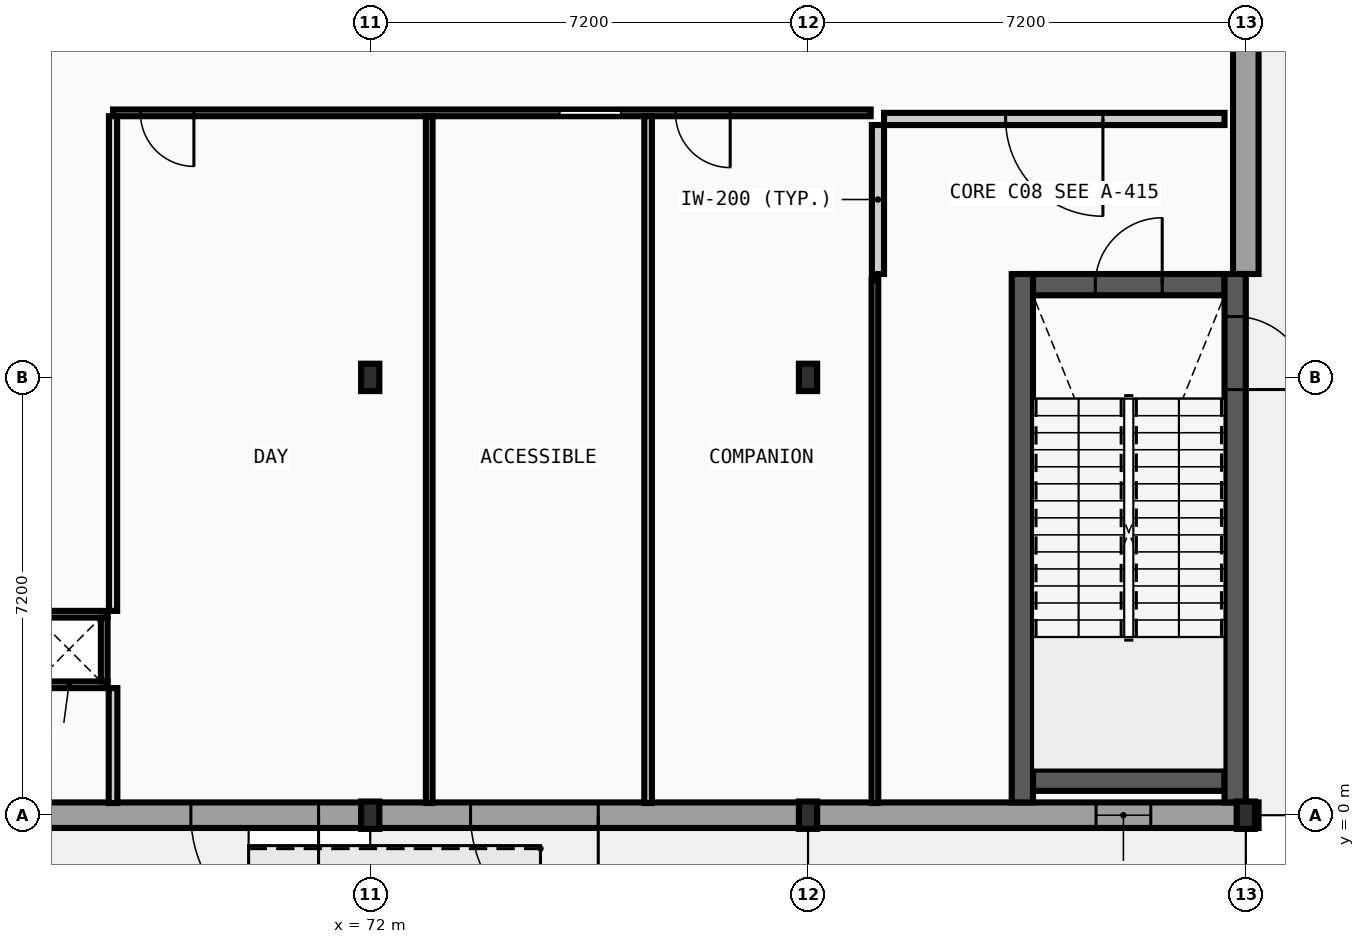
"""IFC4 building model, lengths in metres.
Left out: names, types, materials, properties, quantities, classifications, styles, units other than length and angle.
Written with IfcOpenShell. Run it as: python <this file> out.ifc"""

import sys

from ifc_helpers import new_model, si_unit, direction, frame, frame_2d, origin, origin_2d, place, context, subcontext, project, spatial, rectangle, i_section, extrude, element, fill, save


model = new_model("IFC4")
c1 = context("Model", 3, precision=1e-05, world=origin(), true_north=direction((0.0, 1.0)))
c2 = subcontext(c1, "Body", "Model", "MODEL_VIEW")
j1 = project(units=[si_unit("LENGTHUNIT", "METRE"), si_unit("PLANEANGLEUNIT", "RADIAN")], contexts=[c1])
p1 = place(None, origin())
s1 = spatial("IfcSite", under=j1, at=p1, CompositionType="ELEMENT")
p2 = place(p1, origin())
s2 = spatial("IfcBuilding", under=s1, at=p2, CompositionType="ELEMENT")
p3 = place(p2, origin())
s3 = spatial("IfcBuildingStorey", under=s2, at=p3, CompositionType="ELEMENT", Elevation=0.0)
for number, where, z_axis, x_axis in (
    (1, (72.0, 0.0, 0.0), (0.0, 0.0, 1.0), (1.0, 0.0, 0.0)),
    (2, (72.0, 7.2, 0.0), (0.0, 0.0, 1.0), (1.0, 0.0, 0.0)),
    (3, (79.2, 0.0, 0.0), (0.0, 0.0, 1.0), (1.0, 0.0, 0.0)),
    (4, (79.2, 7.2, 0.0), (0.0, 0.0, 1.0), (1.0, 0.0, 0.0)),
    (5, (86.4, 0.0, 0.0), (0.0, 0.0, 1.0), (1.0, 0.0, 0.0)),
):
    element("IfcColumn", number, at=place(p3, frame(where, z_axis=z_axis, x_axis=x_axis)), inside=s3, PredefinedType="COLUMN", context=c2, shape_type="SweptSolid", body=[
        extrude(i_section(OverallWidth=0.3, OverallDepth=0.45, WebThickness=0.014, FlangeThickness=0.026, FilletRadius=0.027, at=origin_2d()), origin(), (0.0, 0.0, 1.0), 5.2),
    ])
p4 = place(p3, frame((64.8, 0.0, 0.0), z_axis=(0.0, 0.0, 1.0), x_axis=(1.0, 0.0, 0.0)))
e6 = element("IfcWall", 6, at=p4, inside=s3, PredefinedType="STANDARD", context=c2, shape_type="SweptSolid", body=[
    extrude(rectangle(XDim=7.2, YDim=0.42, at=frame_2d((3.6, 0.0))), origin(), (0.0, 0.0, 1.0), 4.665),
])
p5 = place(p4, frame((4.25, 0.0, 0.0)))
e7 = element("IfcOpeningElement", 7, at=p5, cuts=e6, PredefinedType="OPENING", context=c2, shape_type="SweptSolid", body=[
    extrude(rectangle(XDim=2.1, YDim=2.4, at=frame_2d((1.05, 1.2))), frame((0.0, 0.22, 0.0), z_axis=(0.0, -1.0, 0.0), x_axis=(1.0, 0.0, 0.0)), (0.0, 0.0, 1.0), 0.44),
])
p6 = place(p3, frame((72.0, 0.0, 0.0), z_axis=(0.0, 0.0, 1.0), x_axis=(1.0, 0.0, 0.0)))
e8 = element("IfcWall", 8, at=p6, inside=s3, PredefinedType="STANDARD", context=c2, shape_type="SweptSolid", body=[
    extrude(rectangle(XDim=7.2, YDim=0.42, at=frame_2d((3.6, 0.0))), origin(), (0.0, 0.0, 1.0), 4.665),
])
p7 = place(p6, frame((1.65, 0.0, 0.0)))
e9 = element("IfcOpeningElement", 9, at=p7, cuts=e8, PredefinedType="OPENING", context=c2, shape_type="SweptSolid", body=[
    extrude(rectangle(XDim=2.1, YDim=2.4, at=frame_2d((1.05, 1.2))), frame((0.0, 0.22, 0.0), z_axis=(0.0, -1.0, 0.0), x_axis=(1.0, 0.0, 0.0)), (0.0, 0.0, 1.0), 0.44),
])
p8 = place(p3, frame((79.2, 0.0, 0.0), z_axis=(0.0, 0.0, 1.0), x_axis=(1.0, 0.0, 0.0)))
e10 = element("IfcWall", 10, at=p8, inside=s3, PredefinedType="STANDARD", context=c2, shape_type="SweptSolid", body=[
    extrude(rectangle(XDim=7.41, YDim=0.42, at=frame_2d((3.705, 0.0))), origin(), (0.0, 0.0, 1.0), 4.665),
])
p9 = place(p8, frame((4.737, 0.0, 1.1)))
e11 = element("IfcOpeningElement", 11, at=p9, cuts=e10, PredefinedType="OPENING", context=c2, shape_type="SweptSolid", body=[
    extrude(rectangle(XDim=0.9, YDim=1.6, at=frame_2d((0.45, 0.8))), frame((0.0, 0.22, 0.0), z_axis=(0.0, -1.0, 0.0), x_axis=(1.0, 0.0, 0.0)), (0.0, 0.0, 1.0), 0.44),
])
p10 = place(p3, frame((86.4, 8.9, 0.0), z_axis=(0.0, 0.0, 1.0), x_axis=(0.0, 1.0, 0.0)))
e12 = element("IfcWall", 12, at=p10, inside=s3, PredefinedType="STANDARD", context=c2, shape_type="SweptSolid", body=[
    extrude(rectangle(XDim=5.5, YDim=0.42, at=frame_2d((2.75, 0.0))), origin(), (0.0, 0.0, 1.0), 4.97),
])
p11 = place(p3, frame((82.9, 0.575, 0.0), z_axis=(0.0, 0.0, 1.0), x_axis=(1.0, 0.0, 0.0)))
e13 = element("IfcWall", 13, at=p11, inside=s3, PredefinedType="SHEAR", context=c2, shape_type="SweptSolid", body=[
    extrude(rectangle(XDim=3.15, YDim=0.35, at=frame_2d((1.575, 0.0))), origin(), (0.0, 0.0, 1.0), 4.97),
])
p12 = place(p3, frame((82.9, 8.725, 0.0), z_axis=(0.0, 0.0, 1.0), x_axis=(1.0, 0.0, 0.0)))
e14 = element("IfcWall", 14, at=p12, inside=s3, PredefinedType="SHEAR", context=c2, shape_type="SweptSolid", body=[
    extrude(rectangle(XDim=3.15, YDim=0.35, at=frame_2d((1.575, 0.0))), origin(), (0.0, 0.0, 1.0), 4.97),
])
p13 = place(p12, frame((1.025, 0.0, 0.0)))
e15 = element("IfcOpeningElement", 15, at=p13, cuts=e14, PredefinedType="OPENING", context=c2, shape_type="SweptSolid", body=[
    extrude(rectangle(XDim=1.1, YDim=2.15, at=frame_2d((0.55, 1.075))), frame((0.0, 0.185, 0.0), z_axis=(0.0, -1.0, 0.0), x_axis=(1.0, 0.0, 0.0)), (0.0, 0.0, 1.0), 0.37),
])
p14 = place(p3, frame((82.725, 0.21, 0.0), z_axis=(0.0, 0.0, 1.0), x_axis=(0.0, 1.0, 0.0)))
e16 = element("IfcWall", 16, at=p14, inside=s3, PredefinedType="SHEAR", context=c2, shape_type="SweptSolid", body=[
    extrude(rectangle(XDim=8.69, YDim=0.35, at=frame_2d((4.345, 0.0))), origin(), (0.0, 0.0, 1.0), 4.97),
])
p15 = place(p3, frame((86.225, 0.21, 0.0), z_axis=(0.0, 0.0, 1.0), x_axis=(0.0, 1.0, 0.0)))
e17 = element("IfcWall", 17, at=p15, inside=s3, PredefinedType="SHEAR", context=c2, shape_type="SweptSolid", body=[
    extrude(rectangle(XDim=8.69, YDim=0.35, at=frame_2d((4.345, 0.0))), origin(), (0.0, 0.0, 1.0), 4.97),
])
p16 = place(p15, frame((6.79, 0.0, 0.0)))
e18 = element("IfcOpeningElement", 18, at=p16, cuts=e17, PredefinedType="OPENING", context=c2, shape_type="SweptSolid", body=[
    extrude(rectangle(XDim=1.2, YDim=2.15, at=frame_2d((0.6, 1.075))), frame((0.0, 0.185, 0.0), z_axis=(0.0, -1.0, 0.0), x_axis=(1.0, 0.0, 0.0)), (0.0, 0.0, 1.0), 0.37),
])
p17 = place(p3, frame((80.45, 11.45, 0.0), z_axis=(0.0, 0.0, 1.0), x_axis=(1.0, 0.0, 0.0)))
e19 = element("IfcWall", 19, at=p17, inside=s3, PredefinedType="PARTITIONING", context=c2, shape_type="SweptSolid", body=[
    extrude(rectangle(XDim=5.6, YDim=0.2, at=frame_2d((2.8, 0.0))), origin(), (0.0, 0.0, 1.0), 4.97),
])
p18 = place(p17, frame((2.0, 0.0, 0.0)))
e20 = element("IfcOpeningElement", 20, at=p18, cuts=e19, PredefinedType="OPENING", context=c2, shape_type="SweptSolid", body=[
    extrude(rectangle(XDim=1.6, YDim=2.2, at=frame_2d((0.8, 1.1))), frame((0.0, 0.11, 0.0), z_axis=(0.0, -1.0, 0.0), x_axis=(1.0, 0.0, 0.0)), (0.0, 0.0, 1.0), 0.22),
])
p19 = place(p3, frame((80.35, 8.9, 0.0), z_axis=(0.0, 0.0, 1.0), x_axis=(0.0, 1.0, 0.0)))
e21 = element("IfcWall", 21, at=p19, inside=s3, PredefinedType="PARTITIONING", context=c2, shape_type="SweptSolid", body=[
    extrude(rectangle(XDim=2.45, YDim=0.2, at=frame_2d((1.225, 0.0))), origin(), (0.0, 0.0, 1.0), 4.97),
])
for number, where, z_axis, x_axis in (
    (22, (66.41, 2.145, 0.0), (0.0, 0.0, 1.0), (1.0, 0.0, 0.0)),
    (23, (66.41, 3.305, 0.0), (0.0, 0.0, 1.0), (1.0, 0.0, 0.0)),
):
    element("IfcWall", number, at=place(p3, frame(where, z_axis=z_axis, x_axis=x_axis)), inside=s3, PredefinedType="PARTITIONING", context=c2, shape_type="SweptSolid", body=[
        extrude(rectangle(XDim=1.27, YDim=0.11, at=frame_2d((0.635, 0.0))), origin(), (0.0, 0.0, 1.0), 4.97),
    ])
p20 = place(p3, frame((67.625, 2.2, 0.0), z_axis=(0.0, 0.0, 1.0), x_axis=(0.0, 1.0, 0.0)))
e24 = element("IfcWall", 24, at=p20, inside=s3, PredefinedType="PARTITIONING", context=c2, shape_type="SweptSolid", body=[
    extrude(rectangle(XDim=1.05, YDim=0.11, at=frame_2d((0.525, 0.0))), origin(), (0.0, 0.0, 1.0), 4.97),
])
p21 = place(p3, frame((67.77, 11.55, 0.0), z_axis=(0.0, 0.0, 1.0), x_axis=(1.0, 0.0, 0.0)))
e25 = element("IfcWall", 25, at=p21, inside=s3, PredefinedType="PARTITIONING", context=c2, shape_type="SweptSolid", body=[
    extrude(rectangle(XDim=12.46, YDim=0.11, at=frame_2d((6.23, 0.0))), origin(), (0.0, 0.0, 1.0), 4.97),
])
p22 = place(p21, frame((7.35, 0.0, 0.0)))
e26 = element("IfcOpeningElement", 26, at=p22, cuts=e25, PredefinedType="OPENING", context=c2, shape_type="SweptSolid", body=[
    extrude(rectangle(XDim=1.0, YDim=2.1, at=frame_2d((0.5, 1.05))), frame((0.0, 0.065, 0.0), z_axis=(0.0, -1.0, 0.0), x_axis=(1.0, 0.0, 0.0)), (0.0, 0.0, 1.0), 0.13),
])
p23 = place(p21, frame((9.25, 0.0, 0.0)))
e27 = element("IfcOpeningElement", 27, at=p23, cuts=e25, PredefinedType="OPENING", context=c2, shape_type="SweptSolid", body=[
    extrude(rectangle(XDim=0.9, YDim=2.1, at=frame_2d((0.45, 1.05))), frame((0.0, 0.065, 0.0), z_axis=(0.0, -1.0, 0.0), x_axis=(1.0, 0.0, 0.0)), (0.0, 0.0, 1.0), 0.13),
])
p24 = place(p21, frame((0.45, 0.0, 0.0)))
e28 = element("IfcOpeningElement", 28, at=p24, cuts=e25, PredefinedType="OPENING", context=c2, shape_type="SweptSolid", body=[
    extrude(rectangle(XDim=0.88, YDim=2.096, at=frame_2d((0.44, 1.048))), frame((0.0, 0.065, 0.0), z_axis=(0.0, -1.0, 0.0), x_axis=(1.0, 0.0, 0.0)), (0.0, 0.0, 1.0), 0.13),
])
p25 = place(p3, frame((67.77, 0.2, 0.0), z_axis=(0.0, 0.0, 1.0), x_axis=(0.0, 1.0, 0.0)))
e29 = element("IfcWall", 29, at=p25, inside=s3, PredefinedType="PARTITIONING", context=c2, shape_type="SweptSolid", body=[
    extrude(rectangle(XDim=1.89, YDim=0.142, at=frame_2d((0.945, 0.0))), origin(), (0.0, 0.0, 1.0), 4.97),
])
p26 = place(p3, frame((67.77, 3.36, 0.0), z_axis=(0.0, 0.0, 1.0), x_axis=(0.0, 1.0, 0.0)))
e30 = element("IfcWall", 30, at=p26, inside=s3, PredefinedType="PARTITIONING", context=c2, shape_type="SweptSolid", body=[
    extrude(rectangle(XDim=8.135, YDim=0.135, at=frame_2d((4.067, 0.0))), origin(), (0.0, 0.0, 1.0), 4.97),
])
p27 = place(p3, frame((72.97, 0.2, 0.0), z_axis=(0.0, 0.0, 1.0), x_axis=(0.0, 1.0, 0.0)))
e31 = element("IfcWall", 31, at=p27, inside=s3, PredefinedType="PARTITIONING", context=c2, shape_type="SweptSolid", body=[
    extrude(rectangle(XDim=11.295, YDim=0.11, at=frame_2d((5.647, 0.0))), origin(), (0.0, 0.0, 1.0), 4.97),
])
p28 = place(p3, frame((76.57, 0.2, 0.0), z_axis=(0.0, 0.0, 1.0), x_axis=(0.0, 1.0, 0.0)))
e32 = element("IfcWall", 32, at=p28, inside=s3, PredefinedType="PARTITIONING", context=c2, shape_type="SweptSolid", body=[
    extrude(rectangle(XDim=11.295, YDim=0.125, at=frame_2d((5.647, 0.0))), origin(), (0.0, 0.0, 1.0), 4.97),
])
p29 = place(p3, frame((80.3, 0.2, 0.0), z_axis=(0.0, 0.0, 1.0), x_axis=(0.0, 1.0, 0.0)))
e33 = element("IfcWall", 33, at=p29, inside=s3, PredefinedType="PARTITIONING", context=c2, shape_type="SweptSolid", body=[
    extrude(rectangle(XDim=8.6, YDim=0.11, at=frame_2d((4.3, 0.0))), origin(), (0.0, 0.0, 1.0), 4.97),
])
p30 = place(p9, origin())
e34 = element("IfcWindow", 34, at=p30, inside=s3, PartitioningType="SINGLE_PANEL", PredefinedType="WINDOW", context=c2, shape_type="SweptSolid", body=[
    extrude(rectangle(XDim=0.9, YDim=1.6, at=frame_2d((0.45, 0.8))), frame((0.0, 0.03, 0.0), z_axis=(0.0, -1.0, 0.0), x_axis=(1.0, 0.0, 0.0)), (0.0, 0.0, 1.0), 0.06),
])
fill(e11, e34)
p31 = place(p7, origin())
e35 = element("IfcDoor", 35, at=p31, inside=s3, OperationType="DOUBLE_DOOR_SINGLE_SWING", PredefinedType="DOOR", context=c2, shape_type="SweptSolid", body=[
    extrude(rectangle(XDim=2.1, YDim=2.4, at=frame_2d((1.05, 1.2))), frame((0.0, 0.025, 0.0), z_axis=(0.0, -1.0, 0.0), x_axis=(1.0, 0.0, 0.0)), (0.0, 0.0, 1.0), 0.05),
])
fill(e9, e35)
p32 = place(p5, origin())
e36 = element("IfcDoor", 36, at=p32, inside=s3, OperationType="DOUBLE_DOOR_SINGLE_SWING", PredefinedType="DOOR", context=c2, shape_type="SweptSolid", body=[
    extrude(rectangle(XDim=2.1, YDim=2.4, at=frame_2d((1.05, 1.2))), frame((0.0, 0.025, 0.0), z_axis=(0.0, -1.0, 0.0), x_axis=(1.0, 0.0, 0.0)), (0.0, 0.0, 1.0), 0.05),
])
fill(e7, e36)
p33 = place(p13, frame((1.1, 0.0, 0.0), z_axis=(0.0, 0.0, 1.0), x_axis=(-1.0, 0.0, 0.0)))
e37 = element("IfcDoor", 37, at=p33, inside=s3, OperationType="SINGLE_SWING_RIGHT", PredefinedType="DOOR", context=c2, shape_type="SweptSolid", body=[
    extrude(rectangle(XDim=1.1, YDim=2.15, at=frame_2d((0.55, 1.075))), frame((0.0, 0.025, 0.0), z_axis=(0.0, -1.0, 0.0), x_axis=(1.0, 0.0, 0.0)), (0.0, 0.0, 1.0), 0.05),
])
fill(e15, e37)
p34 = place(p16, frame((1.2, 0.0, 0.0), z_axis=(0.0, 0.0, 1.0), x_axis=(-1.0, 0.0, 0.0)))
e38 = element("IfcDoor", 38, at=p34, inside=s3, OperationType="SINGLE_SWING_LEFT", PredefinedType="DOOR", context=c2, shape_type="SweptSolid", body=[
    extrude(rectangle(XDim=1.2, YDim=2.15, at=frame_2d((0.6, 1.075))), frame((0.0, 0.025, 0.0), z_axis=(0.0, -1.0, 0.0), x_axis=(1.0, 0.0, 0.0)), (0.0, 0.0, 1.0), 0.05),
])
fill(e18, e38)
p35 = place(p18, origin())
e39 = element("IfcDoor", 39, at=p35, inside=s3, OperationType="DOUBLE_DOOR_SINGLE_SWING", PredefinedType="DOOR", context=c2, shape_type="SweptSolid", body=[
    extrude(rectangle(XDim=1.6, YDim=2.2, at=frame_2d((0.8, 1.1))), frame((0.0, 0.025, 0.0), z_axis=(0.0, -1.0, 0.0), x_axis=(1.0, 0.0, 0.0)), (0.0, 0.0, 1.0), 0.05),
])
fill(e20, e39)
p36 = place(p22, origin())
e40 = element("IfcDoor", 40, at=p36, inside=s3, OperationType="SLIDING_TO_LEFT", PredefinedType="DOOR", context=c2, shape_type="SweptSolid", body=[
    extrude(rectangle(XDim=1.0, YDim=2.1, at=frame_2d((0.5, 1.05))), frame((0.0, 0.025, 0.0), z_axis=(0.0, -1.0, 0.0), x_axis=(1.0, 0.0, 0.0)), (0.0, 0.0, 1.0), 0.05),
])
fill(e26, e40)
p37 = place(p23, origin())
e41 = element("IfcDoor", 41, at=p37, inside=s3, OperationType="SINGLE_SWING_RIGHT", PredefinedType="DOOR", context=c2, shape_type="SweptSolid", body=[
    extrude(rectangle(XDim=0.9, YDim=2.1, at=frame_2d((0.45, 1.05))), frame((0.0, 0.025, 0.0), z_axis=(0.0, -1.0, 0.0), x_axis=(1.0, 0.0, 0.0)), (0.0, 0.0, 1.0), 0.05),
])
fill(e27, e41)
p38 = place(p24, origin())
e42 = element("IfcDoor", 42, at=p38, inside=s3, OperationType="SINGLE_SWING_RIGHT", PredefinedType="DOOR", context=c2, shape_type="SweptSolid", body=[
    extrude(rectangle(XDim=0.88, YDim=2.096, at=frame_2d((0.44, 1.048))), frame((0.0, 0.025, 0.0), z_axis=(0.0, -1.0, 0.0), x_axis=(1.0, 0.0, 0.0)), (0.0, 0.0, 1.0), 0.05),
])
fill(e28, e42)
save(model, sys.argv[1])
